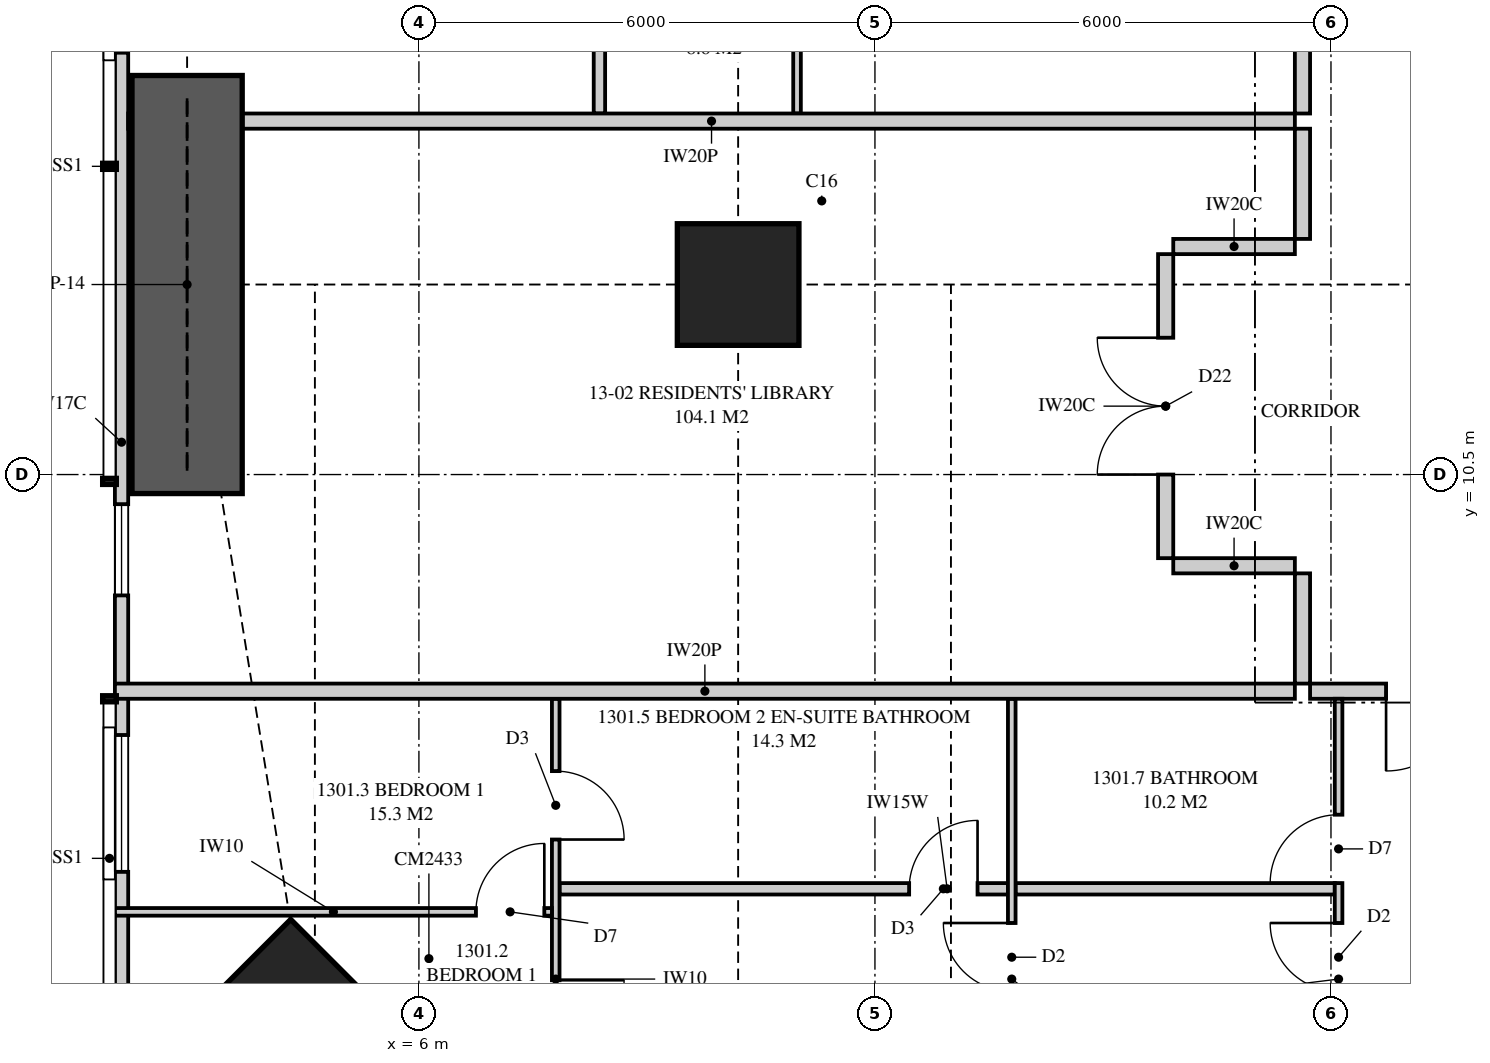
"""IFC4 building model, lengths in metres.
Left out: names, types, materials, properties, quantities, classifications, styles, units other than length and angle.
Written with IfcOpenShell. Run it as: python <this file> out.ifc"""

import sys

from ifc_helpers import new_model, si_unit, direction, frame, frame_2d, origin, origin_2d, place, context, subcontext, project, spatial, polyline, rectangle, outline, extrude, element, fill, save


model = new_model("IFC4")
c1 = context("Model", 3, precision=1e-05, world=origin(), true_north=direction((0.0, 1.0)))
c2 = subcontext(c1, "Body", "Model", "MODEL_VIEW")
j1 = project(units=[si_unit("LENGTHUNIT", "METRE"), si_unit("PLANEANGLEUNIT", "RADIAN")], contexts=[c1])
p1 = place(None, origin())
s1 = spatial("IfcSite", under=j1, at=p1, CompositionType="ELEMENT")
p2 = place(p1, origin())
s2 = spatial("IfcBuilding", under=s1, at=p2, CompositionType="ELEMENT")
p3 = place(p2, frame((0.0, 0.0, 51.15)))
s3 = spatial("IfcBuildingStorey", under=s2, at=p3, CompositionType="ELEMENT", Elevation=51.15)
p4 = place(p3, frame((4.631, 2.631, 0.0), z_axis=(0.0, 0.0, 1.0), x_axis=(0.707106781187, 0.707106781187, 0.0)))
e1 = element("IfcColumn", 1, at=p4, inside=s3, PredefinedType="COLUMN", context=c2, shape_type="SweptSolid", body=[
    extrude(rectangle(XDim=2.4, YDim=3.3, at=origin_2d()), origin(), (0.0, 0.0, 1.0), 3.35),
])
p5 = place(p3, frame((10.2, 13.0, 0.0), z_axis=(0.0, 0.0, 1.0), x_axis=(1.0, 0.0, 0.0)))
e2 = element("IfcColumn", 2, at=p5, inside=s3, PredefinedType="COLUMN", context=c2, shape_type="SweptSolid", body=[
    extrude(rectangle(XDim=1.6, YDim=1.6, at=origin_2d()), origin(), (0.0, 0.0, 1.0), 3.35),
])
p6 = place(p3, frame((2.087, 18.8, 0.0), z_axis=(0.0, 0.0, 1.0), x_axis=(0.0, -1.0, 0.0)))
e3 = element("IfcWall", 3, at=p6, inside=s3, PredefinedType="SOLIDWALL", context=c2, shape_type="SweptSolid", body=[
    extrude(outline(polyline([(0.0, 0.0), (15.749, 0.0), (15.749, 3.11), (6.019, 3.11), (6.019, 2.15), (5.926, 2.15), (5.926, 3.11), (5.8, 3.11), (5.8, 2.15), (0.0, 2.15), (0.0, 0.0)])), frame((0.0, 0.087, 0.0), z_axis=(0.0, -1.0, 0.0), x_axis=(1.0, 0.0, 0.0)), (0.0, 0.0, 1.0), 0.175),
])
p7 = place(p6, frame((0.95, 0.0, 0.4)))
e4 = element("IfcOpeningElement", 4, at=p7, cuts=e3, PredefinedType="OPENING", context=c2, shape_type="SweptSolid", body=[
    extrude(rectangle(XDim=1.8, YDim=1.7, at=frame_2d((0.9, 0.85))), frame((0.0, 0.097, 0.0), z_axis=(0.0, -1.0, 0.0), x_axis=(1.0, 0.0, 0.0)), (0.0, 0.0, 1.0), 0.195),
])
p8 = place(p6, frame((8.69, 0.0, 0.4)))
e5 = element("IfcOpeningElement", 5, at=p8, cuts=e3, PredefinedType="OPENING", context=c2, shape_type="SweptSolid", body=[
    extrude(rectangle(XDim=1.2, YDim=1.7, at=frame_2d((0.6, 0.85))), frame((0.0, 0.097, 0.0), z_axis=(0.0, -1.0, 0.0), x_axis=(1.0, 0.0, 0.0)), (0.0, 0.0, 1.0), 0.195),
])
p9 = place(p6, frame((11.727, 0.0, 0.4)))
e6 = element("IfcOpeningElement", 6, at=p9, cuts=e3, PredefinedType="OPENING", context=c2, shape_type="SweptSolid", body=[
    extrude(rectangle(XDim=1.8, YDim=1.7, at=frame_2d((0.9, 0.85))), frame((0.0, 0.097, 0.0), z_axis=(0.0, -1.0, 0.0), x_axis=(1.0, 0.0, 0.0)), (0.0, 0.0, 1.0), 0.195),
])
p10 = place(p3, frame((17.725, 7.65, 0.0), z_axis=(0.0, 0.0, 1.0), x_axis=(1.0, 0.0, 0.0)))
e7 = element("IfcWall", 7, at=p10, inside=s3, PredefinedType="PARTITIONING", context=c2, shape_type="SweptSolid", body=[
    extrude(outline(polyline([(0.0, 0.0), (18.625, 0.0), (18.625, 3.11), (17.612, 3.11), (17.612, 2.541), (16.938, 2.541), (16.938, 3.11), (6.612, 3.11), (6.612, 2.541), (5.938, 2.541), (5.938, 3.11), (0.0, 3.11), (0.0, 0.0)])), frame((0.0, 0.1, 0.0), z_axis=(0.0, -1.0, 0.0), x_axis=(1.0, 0.0, 0.0)), (0.0, 0.0, 1.0), 0.2),
])
p11 = place(p10, frame((1.0, 0.0, 0.0)))
e8 = element("IfcOpeningElement", 8, at=p11, cuts=e7, PredefinedType="OPENING", context=c2, shape_type="SweptSolid", body=[
    extrude(rectangle(XDim=1.05, YDim=2.2, at=frame_2d((0.525, 1.1))), frame((0.0, 0.11, 0.0), z_axis=(0.0, -1.0, 0.0), x_axis=(1.0, 0.0, 0.0)), (0.0, 0.0, 1.0), 0.22),
])
p12 = place(p3, frame((7.8, 0.175, 0.0), z_axis=(0.0, 0.0, 1.0), x_axis=(0.0, 1.0, 0.0)))
e9 = element("IfcWall", 9, at=p12, inside=s3, PredefinedType="PARTITIONING", context=c2, shape_type="SweptSolid", body=[
    extrude(outline(polyline([(0.0, 0.0), (7.375, 0.0), (7.375, 3.11), (2.697, 3.11), (2.697, 2.15), (0.943, 2.15), (0.943, 3.11), (0.0, 3.11), (0.0, 0.0)])), frame((0.0, 0.05, 0.0), z_axis=(0.0, -1.0, 0.0), x_axis=(1.0, 0.0, 0.0)), (0.0, 0.0, 1.0), 0.1),
])
p13 = place(p12, frame((2.772, 0.0, 0.0)))
e10 = element("IfcOpeningElement", 10, at=p13, cuts=e9, PredefinedType="OPENING", context=c2, shape_type="SweptSolid", body=[
    extrude(rectangle(XDim=0.9, YDim=2.1, at=frame_2d((0.45, 1.05))), frame((0.0, 0.06, 0.0), z_axis=(0.0, -1.0, 0.0), x_axis=(1.0, 0.0, 0.0)), (0.0, 0.0, 1.0), 0.12),
])
p14 = place(p12, frame((5.523, 0.0, 0.0)))
e11 = element("IfcOpeningElement", 11, at=p14, cuts=e9, PredefinedType="OPENING", context=c2, shape_type="SweptSolid", body=[
    extrude(rectangle(XDim=0.9, YDim=2.1, at=frame_2d((0.45, 1.05))), frame((0.0, 0.06, 0.0), z_axis=(0.0, -1.0, 0.0), x_axis=(1.0, 0.0, 0.0)), (0.0, 0.0, 1.0), 0.12),
])
p15 = place(p3, frame((13.8, 0.175, 0.0), z_axis=(0.0, 0.0, 1.0), x_axis=(0.0, 1.0, 0.0)))
e12 = element("IfcWall", 12, at=p15, inside=s3, PredefinedType="PARTITIONING", context=c2, shape_type="SweptSolid", body=[
    extrude(outline(polyline([(1.635, 2.15), (0.0, 2.15), (0.0, 0.0), (7.375, 0.0), (7.375, 3.11), (1.635, 3.11), (1.635, 2.15)]), holes=[polyline([(1.021, 0.133), (0.529, 0.133), (0.529, 0.923), (1.021, 0.923), (1.021, 0.133)]), polyline([(1.021, 1.227), (0.529, 1.227), (0.529, 2.017), (1.021, 2.017), (1.021, 1.227)])]), frame((0.0, 0.05, 0.0), z_axis=(0.0, -1.0, 0.0), x_axis=(1.0, 0.0, 0.0)), (0.0, 0.0, 1.0), 0.1),
])
p16 = place(p15, frame((3.525, 0.0, 0.0)))
e13 = element("IfcOpeningElement", 13, at=p16, cuts=e12, PredefinedType="OPENING", context=c2, shape_type="SweptSolid", body=[
    extrude(rectangle(XDim=0.9, YDim=2.1, at=frame_2d((0.45, 1.05))), frame((0.0, 0.06, 0.0), z_axis=(0.0, -1.0, 0.0), x_axis=(1.0, 0.0, 0.0)), (0.0, 0.0, 1.0), 0.12),
])
p17 = place(p3, frame((18.1, 0.175, 0.0), z_axis=(0.0, 0.0, 1.0), x_axis=(0.0, 1.0, 0.0)))
e14 = element("IfcWall", 14, at=p17, inside=s3, PredefinedType="PARTITIONING", context=c2, shape_type="SweptSolid", body=[
    extrude(outline(polyline([(0.0, 0.0), (7.375, 0.0), (7.375, 3.11), (1.635, 3.11), (1.635, 2.15), (0.0, 2.15), (0.0, 3.11), (0.0, 0.0)])), frame((0.0, 0.05, 0.0), z_axis=(0.0, -1.0, 0.0), x_axis=(1.0, 0.0, 0.0)), (0.0, 0.0, 1.0), 0.1),
])
p18 = place(p17, frame((3.525, 0.0, 0.0)))
e15 = element("IfcOpeningElement", 15, at=p18, cuts=e14, PredefinedType="OPENING", context=c2, shape_type="SweptSolid", body=[
    extrude(rectangle(XDim=0.9, YDim=2.1, at=frame_2d((0.45, 1.05))), frame((0.0, 0.06, 0.0), z_axis=(0.0, -1.0, 0.0), x_axis=(1.0, 0.0, 0.0)), (0.0, 0.0, 1.0), 0.12),
])
p19 = place(p17, frame((4.95, 0.0, 0.0)))
e16 = element("IfcOpeningElement", 16, at=p19, cuts=e14, PredefinedType="OPENING", context=c2, shape_type="SweptSolid", body=[
    extrude(rectangle(XDim=0.9, YDim=2.1, at=frame_2d((0.45, 1.05))), frame((0.0, 0.06, 0.0), z_axis=(0.0, -1.0, 0.0), x_axis=(1.0, 0.0, 0.0)), (0.0, 0.0, 1.0), 0.12),
])
p20 = place(p3, frame((2.0, 4.747, 0.0), z_axis=(0.0, 0.0, 1.0), x_axis=(1.0, 0.0, 0.0)))
e17 = element("IfcWall", 17, at=p20, inside=s3, PredefinedType="PARTITIONING", context=c2, shape_type="SweptSolid", body=[
    extrude(outline(polyline([(0.0, 0.0), (5.75, 0.0), (5.75, 3.11), (3.16, 3.11), (3.16, 2.15), (1.417, 2.15), (1.417, 3.11), (0.0, 3.11), (0.0, 0.0)])), frame((0.0, 0.05, 0.0), z_axis=(0.0, -1.0, 0.0), x_axis=(1.0, 0.0, 0.0)), (0.0, 0.0, 1.0), 0.1),
])
p21 = place(p20, frame((4.75, 0.0, 0.0)))
e18 = element("IfcOpeningElement", 18, at=p21, cuts=e17, PredefinedType="OPENING", context=c2, shape_type="SweptSolid", body=[
    extrude(rectangle(XDim=0.9, YDim=2.1, at=frame_2d((0.45, 1.05))), frame((0.0, 0.06, 0.0), z_axis=(0.0, -1.0, 0.0), x_axis=(1.0, 0.0, 0.0)), (0.0, 0.0, 1.0), 0.12),
])
p22 = place(p3, frame((7.85, 5.05, 0.0), z_axis=(0.0, 0.0, 1.0), x_axis=(1.0, 0.0, 0.0)))
e19 = element("IfcWall", 19, at=p22, inside=s3, PredefinedType="PLUMBINGWALL", context=c2, shape_type="SweptSolid", body=[
    extrude(outline(polyline([(0.0, 0.0), (5.9, 0.0), (5.9, 3.11), (5.462, 3.11), (5.462, 2.541), (4.838, 2.541), (4.838, 3.11), (3.635, 3.11), (3.635, 2.51), (1.065, 2.51), (1.065, 3.11), (0.0, 3.11), (0.0, 0.0)])), frame((0.0, 0.075, 0.0), z_axis=(0.0, -1.0, 0.0), x_axis=(1.0, 0.0, 0.0)), (0.0, 0.0, 1.0), 0.15),
])
p23 = place(p22, frame((4.6, 0.0, 0.0)))
e20 = element("IfcOpeningElement", 20, at=p23, cuts=e19, PredefinedType="OPENING", context=c2, shape_type="SweptSolid", body=[
    extrude(rectangle(XDim=0.9, YDim=2.1, at=frame_2d((0.45, 1.05))), frame((0.0, 0.085, 0.0), z_axis=(0.0, -1.0, 0.0), x_axis=(1.0, 0.0, 0.0)), (0.0, 0.0, 1.0), 0.17),
])
p24 = place(p3, frame((13.85, 5.05, 0.0), z_axis=(0.0, 0.0, 1.0), x_axis=(1.0, 0.0, 0.0)))
e21 = element("IfcWall", 21, at=p24, inside=s3, PredefinedType="PLUMBINGWALL", context=c2, shape_type="SweptSolid", body=[
    extrude(rectangle(XDim=4.2, YDim=0.15, at=frame_2d((2.1, 0.0))), origin(), (0.0, 0.0, 1.0), 3.11),
])
p25 = place(p3, frame((2.0, 7.65, 0.0), z_axis=(0.0, 0.0, 1.0), x_axis=(1.0, 0.0, 0.0)))
e22 = element("IfcWall", 22, at=p25, inside=s3, PredefinedType="PARTITIONING", context=c2, shape_type="SweptSolid", body=[
    extrude(outline(polyline([(0.0, 0.0), (15.525, 0.0), (15.525, 3.11), (11.337, 3.11), (11.337, 2.541), (10.663, 2.541), (10.663, 3.11), (9.51, 3.11), (9.51, 2.51), (6.89, 2.51), (6.89, 3.11), (2.969, 3.11), (2.969, 2.541), (2.74, 2.541), (2.74, 2.15), (0.896, 2.15), (0.896, 3.11), (0.0, 3.11), (0.0, 0.0)])), frame((0.0, 0.1, 0.0), z_axis=(0.0, -1.0, 0.0), x_axis=(1.0, 0.0, 0.0)), (0.0, 0.0, 1.0), 0.2),
])
p26 = place(p3, frame((2.175, 15.15, 0.0), z_axis=(0.0, 0.0, 1.0), x_axis=(1.0, 0.0, 0.0)))
e23 = element("IfcWall", 23, at=p26, inside=s3, PredefinedType="PARTITIONING", context=c2, shape_type="SweptSolid", body=[
    extrude(outline(polyline([(0.529, 2.15), (0.0, 2.15), (0.0, 0.0), (0.529, 0.0), (0.529, 0.034), (1.021, 0.034), (1.021, 0.0), (15.35, 0.0), (15.35, 3.11), (9.335, 3.11), (9.335, 2.51), (6.715, 2.51), (6.715, 3.11), (1.685, 3.11), (1.685, 2.15), (1.021, 2.15), (1.021, 2.116), (0.529, 2.116), (0.529, 2.15)])), frame((0.0, 0.1, 0.0), z_axis=(0.0, -1.0, 0.0), x_axis=(1.0, 0.0, 0.0)), (0.0, 0.0, 1.0), 0.2),
])
p27 = place(p3, frame((17.625, 7.75, 0.0), z_axis=(0.0, 0.0, 1.0), x_axis=(0.0, 1.0, 0.0)))
e24 = element("IfcWall", 24, at=p27, inside=s3, PredefinedType="PARTITIONING", context=c2, shape_type="SweptSolid", body=[
    extrude(rectangle(XDim=1.45, YDim=0.2, at=frame_2d((0.725, 0.0))), origin(), (0.0, 0.0, 1.0), 3.11),
])
p28 = place(p3, frame((17.625, 15.25, 0.0), z_axis=(0.0, 0.0, 1.0), x_axis=(0.0, 1.0, 0.0)))
e25 = element("IfcWall", 25, at=p28, inside=s3, PredefinedType="PARTITIONING", context=c2, shape_type="SweptSolid", body=[
    extrude(outline(polyline([(0.0, 0.0), (14.0, 0.0), (14.0, 3.11), (10.087, 3.11), (10.087, 2.541), (9.413, 2.541), (9.413, 3.11), (0.0, 3.11), (0.0, 0.0)])), frame((0.0, 0.1, 0.0), z_axis=(0.0, -1.0, 0.0), x_axis=(1.0, 0.0, 0.0)), (0.0, 0.0, 1.0), 0.2),
])
p29 = place(p28, frame((6.5, 0.0, 0.0)))
e26 = element("IfcOpeningElement", 26, at=p29, cuts=e25, PredefinedType="OPENING", context=c2, shape_type="SweptSolid", body=[
    extrude(rectangle(XDim=1.05, YDim=2.2, at=frame_2d((0.525, 1.1))), frame((0.0, 0.11, 0.0), z_axis=(0.0, -1.0, 0.0), x_axis=(1.0, 0.0, 0.0)), (0.0, 0.0, 1.0), 0.22),
])
p30 = place(p3, frame((8.375, 15.25, 0.0), z_axis=(0.0, 0.0, 1.0), x_axis=(0.0, 1.0, 0.0)))
e27 = element("IfcWall", 27, at=p30, inside=s3, PredefinedType="PLUMBINGWALL", context=c2, shape_type="SweptSolid", body=[
    extrude(rectangle(XDim=3.45, YDim=0.15, at=frame_2d((1.725, 0.0))), origin(), (0.0, 0.0, 1.0), 3.11),
])
p31 = place(p30, frame((2.15, 0.0, 0.0)))
e28 = element("IfcOpeningElement", 28, at=p31, cuts=e27, PredefinedType="OPENING", context=c2, shape_type="SweptSolid", body=[
    extrude(rectangle(XDim=0.9, YDim=2.1, at=frame_2d((0.45, 1.05))), frame((0.0, 0.085, 0.0), z_axis=(0.0, -1.0, 0.0), x_axis=(1.0, 0.0, 0.0)), (0.0, 0.0, 1.0), 0.17),
])
p32 = place(p3, frame((10.975, 15.25, 0.0), z_axis=(0.0, 0.0, 1.0), x_axis=(0.0, 1.0, 0.0)))
e29 = element("IfcWall", 29, at=p32, inside=s3, PredefinedType="PARTITIONING", context=c2, shape_type="SweptSolid", body=[
    extrude(outline(polyline([(0.0, 0.0), (3.45, 0.0), (3.45, 3.11), (3.45, 2.51), (0.0, 2.51), (0.0, 3.11), (0.0, 0.0)])), frame((0.0, 0.05, 0.0), z_axis=(0.0, -1.0, 0.0), x_axis=(1.0, 0.0, 0.0)), (0.0, 0.0, 1.0), 0.1),
])
p33 = place(p3, frame((17.625, 13.6, 0.0), z_axis=(0.0, 0.0, 1.0), x_axis=(0.0, 1.0, 0.0)))
e30 = element("IfcWall", 30, at=p33, inside=s3, PredefinedType="PARTITIONING", context=c2, shape_type="SweptSolid", body=[
    extrude(rectangle(XDim=1.45, YDim=0.2, at=frame_2d((0.725, 0.0))), origin(), (0.0, 0.0, 1.0), 3.11),
])
p34 = place(p3, frame((15.825, 9.4, 0.0), z_axis=(0.0, 0.0, 1.0), x_axis=(0.0, 1.0, 0.0)))
e31 = element("IfcWall", 31, at=p34, inside=s3, PredefinedType="PARTITIONING", context=c2, shape_type="SweptSolid", body=[
    extrude(outline(polyline([(0.0, 0.0), (4.0, 0.0), (4.0, 3.11), (3.937, 3.11), (3.937, 2.541), (3.263, 2.541), (3.263, 3.11), (0.0, 3.11), (0.0, 0.0)])), frame((0.0, 0.1, 0.0), z_axis=(0.0, -1.0, 0.0), x_axis=(1.0, 0.0, 0.0)), (0.0, 0.0, 1.0), 0.2),
])
p35 = place(p34, frame((1.1, 0.0, 0.0)))
e32 = element("IfcOpeningElement", 32, at=p35, cuts=e31, PredefinedType="OPENING", context=c2, shape_type="SweptSolid", body=[
    extrude(rectangle(XDim=1.8, YDim=2.1, at=frame_2d((0.9, 1.05))), frame((0.0, 0.11, 0.0), z_axis=(0.0, -1.0, 0.0), x_axis=(1.0, 0.0, 0.0)), (0.0, 0.0, 1.0), 0.22),
])
for number, where, z_axis, x_axis in (
    (33, (17.525, 9.3, 0.0), (0.0, 0.0, 1.0), (-1.0, 0.0, 0.0)),
    (34, (17.525, 13.5, 0.0), (0.0, 0.0, 1.0), (-1.0, 0.0, 0.0)),
):
    element("IfcWall", number, at=place(p3, frame(where, z_axis=z_axis, x_axis=x_axis)), inside=s3, PredefinedType="PARTITIONING", context=c2, shape_type="SweptSolid", body=[
        extrude(rectangle(XDim=1.6, YDim=0.2, at=frame_2d((0.8, 0.0))), origin(), (0.0, 0.0, 1.0), 3.11),
    ])
p36 = place(p3, frame((2.95, 10.25, 0.0), z_axis=(0.0, 0.0, 1.0), x_axis=(0.0, 1.0, 0.0)))
e35 = element("IfcWall", 35, at=p36, inside=s3, PredefinedType="SHEAR", context=c2, shape_type="SweptSolid", body=[
    extrude(rectangle(XDim=5.5, YDim=1.45, at=frame_2d((2.75, 0.0))), origin(), (0.0, 0.0, 1.0), 3.35),
])
p37 = place(p8, origin())
e36 = element("IfcWindow", 36, at=p37, inside=s3, PartitioningType="SINGLE_PANEL", PredefinedType="WINDOW", context=c2, shape_type="SweptSolid", body=[
    extrude(rectangle(XDim=1.2, YDim=1.7, at=frame_2d((0.6, 0.85))), frame((0.0, 0.03, 0.0), z_axis=(0.0, -1.0, 0.0), x_axis=(1.0, 0.0, 0.0)), (0.0, 0.0, 1.0), 0.06),
])
fill(e5, e36)
p38 = place(p9, origin())
e37 = element("IfcWindow", 37, at=p38, inside=s3, PartitioningType="SINGLE_PANEL", PredefinedType="WINDOW", context=c2, shape_type="SweptSolid", body=[
    extrude(rectangle(XDim=1.8, YDim=1.7, at=frame_2d((0.9, 0.85))), frame((0.0, 0.03, 0.0), z_axis=(0.0, -1.0, 0.0), x_axis=(1.0, 0.0, 0.0)), (0.0, 0.0, 1.0), 0.06),
])
fill(e6, e37)
p39 = place(p11, frame((1.05, 0.0, 0.0), z_axis=(0.0, 0.0, 1.0), x_axis=(-1.0, 0.0, 0.0)))
e38 = element("IfcDoor", 38, at=p39, inside=s3, OperationType="SINGLE_SWING_RIGHT", PredefinedType="DOOR", context=c2, shape_type="SweptSolid", body=[
    extrude(rectangle(XDim=1.05, YDim=2.2, at=frame_2d((0.525, 1.1))), frame((0.0, 0.025, 0.0), z_axis=(0.0, -1.0, 0.0), x_axis=(1.0, 0.0, 0.0)), (0.0, 0.0, 1.0), 0.05),
])
fill(e8, e38)
p40 = place(p21, origin())
e39 = element("IfcDoor", 39, at=p40, inside=s3, OperationType="SINGLE_SWING_RIGHT", PredefinedType="DOOR", context=c2, shape_type="SweptSolid", body=[
    extrude(rectangle(XDim=0.9, YDim=2.1, at=frame_2d((0.45, 1.05))), frame((0.0, 0.025, 0.0), z_axis=(0.0, -1.0, 0.0), x_axis=(1.0, 0.0, 0.0)), (0.0, 0.0, 1.0), 0.05),
])
fill(e18, e39)
p41 = place(p13, frame((0.9, 0.0, 0.0), z_axis=(0.0, 0.0, 1.0), x_axis=(-1.0, 0.0, 0.0)))
e40 = element("IfcDoor", 40, at=p41, inside=s3, OperationType="SINGLE_SWING_LEFT", PredefinedType="DOOR", context=c2, shape_type="SweptSolid", body=[
    extrude(rectangle(XDim=0.9, YDim=2.1, at=frame_2d((0.45, 1.05))), frame((0.0, 0.025, 0.0), z_axis=(0.0, -1.0, 0.0), x_axis=(1.0, 0.0, 0.0)), (0.0, 0.0, 1.0), 0.05),
])
fill(e10, e40)
p42 = place(p16, origin())
e41 = element("IfcDoor", 41, at=p42, inside=s3, OperationType="SINGLE_SWING_RIGHT", PredefinedType="DOOR", context=c2, shape_type="SweptSolid", body=[
    extrude(rectangle(XDim=0.9, YDim=2.1, at=frame_2d((0.45, 1.05))), frame((0.0, 0.025, 0.0), z_axis=(0.0, -1.0, 0.0), x_axis=(1.0, 0.0, 0.0)), (0.0, 0.0, 1.0), 0.05),
])
fill(e13, e41)
p43 = place(p23, origin())
e42 = element("IfcDoor", 42, at=p43, inside=s3, OperationType="SINGLE_SWING_RIGHT", PredefinedType="DOOR", context=c2, shape_type="SweptSolid", body=[
    extrude(rectangle(XDim=0.9, YDim=2.1, at=frame_2d((0.45, 1.05))), frame((0.0, 0.025, 0.0), z_axis=(0.0, -1.0, 0.0), x_axis=(1.0, 0.0, 0.0)), (0.0, 0.0, 1.0), 0.05),
])
fill(e20, e42)
p44 = place(p18, origin())
e43 = element("IfcDoor", 43, at=p44, inside=s3, OperationType="SINGLE_SWING_RIGHT", PredefinedType="DOOR", context=c2, shape_type="SweptSolid", body=[
    extrude(rectangle(XDim=0.9, YDim=2.1, at=frame_2d((0.45, 1.05))), frame((0.0, 0.025, 0.0), z_axis=(0.0, -1.0, 0.0), x_axis=(1.0, 0.0, 0.0)), (0.0, 0.0, 1.0), 0.05),
])
fill(e15, e43)
p45 = place(p19, origin())
e44 = element("IfcDoor", 44, at=p45, inside=s3, OperationType="SINGLE_SWING_LEFT", PredefinedType="DOOR", context=c2, shape_type="SweptSolid", body=[
    extrude(rectangle(XDim=0.9, YDim=2.1, at=frame_2d((0.45, 1.05))), frame((0.0, 0.025, 0.0), z_axis=(0.0, -1.0, 0.0), x_axis=(1.0, 0.0, 0.0)), (0.0, 0.0, 1.0), 0.05),
])
fill(e16, e44)
p46 = place(p14, frame((0.9, 0.0, 0.0), z_axis=(0.0, 0.0, 1.0), x_axis=(-1.0, 0.0, 0.0)))
e45 = element("IfcDoor", 45, at=p46, inside=s3, OperationType="SINGLE_SWING_RIGHT", PredefinedType="DOOR", context=c2, shape_type="SweptSolid", body=[
    extrude(rectangle(XDim=0.9, YDim=2.1, at=frame_2d((0.45, 1.05))), frame((0.0, 0.025, 0.0), z_axis=(0.0, -1.0, 0.0), x_axis=(1.0, 0.0, 0.0)), (0.0, 0.0, 1.0), 0.05),
])
fill(e11, e45)
p47 = place(p35, origin())
e46 = element("IfcDoor", 46, at=p47, inside=s3, OperationType="DOUBLE_DOOR_SINGLE_SWING", PredefinedType="DOOR", context=c2, shape_type="SweptSolid", body=[
    extrude(rectangle(XDim=1.8, YDim=2.1, at=frame_2d((0.9, 1.05))), frame((0.0, 0.025, 0.0), z_axis=(0.0, -1.0, 0.0), x_axis=(1.0, 0.0, 0.0)), (0.0, 0.0, 1.0), 0.05),
])
fill(e32, e46)
save(model, sys.argv[1])
